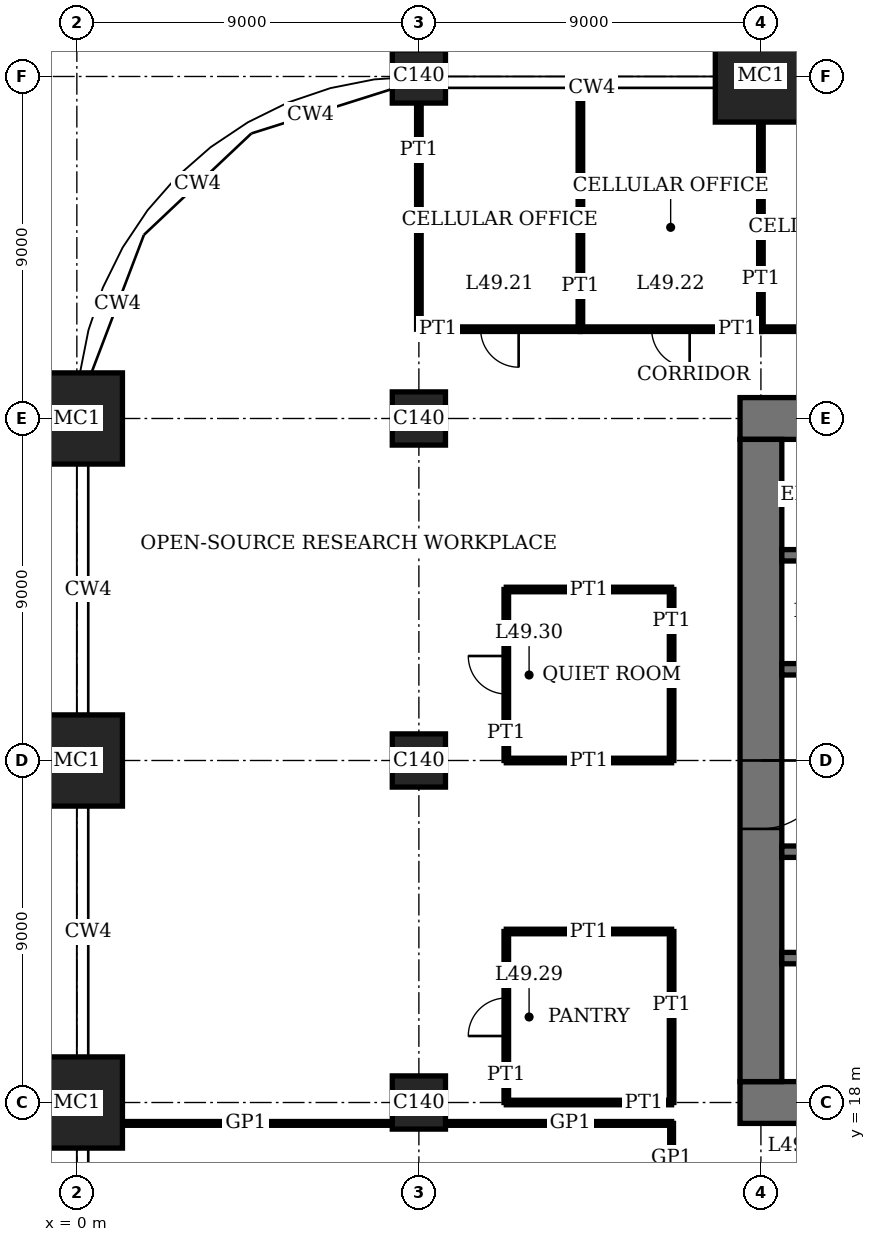
"""IFC4 building model, lengths in metres.
Left out: names, types, materials, properties, quantities, classifications, styles, units other than length and angle.
Written with IfcOpenShell. Run it as: python <this file> out.ifc"""

import sys

from ifc_helpers import new_model, si_unit, direction, frame, frame_2d, origin, origin_2d, place, context, subcontext, project, spatial, rectangle, extrude, element, fill, save


model = new_model("IFC4")
c1 = context("Model", 3, precision=1e-05, world=origin(), true_north=direction((0.0, 1.0)))
c2 = subcontext(c1, "Body", "Model", "MODEL_VIEW")
j1 = project(units=[si_unit("LENGTHUNIT", "METRE"), si_unit("PLANEANGLEUNIT", "RADIAN")], contexts=[c1])
p1 = place(None, origin())
s1 = spatial("IfcSite", under=j1, at=p1, CompositionType="ELEMENT")
p2 = place(p1, origin())
s2 = spatial("IfcBuilding", under=s1, at=p2, CompositionType="ELEMENT")
p3 = place(p2, frame((0.0, 0.0, 202.2)))
s3 = spatial("IfcBuildingStorey", under=s2, at=p3, CompositionType="ELEMENT", Elevation=202.2)
for number, where, z_axis, x_axis in (
    (1, (0.0, 18.0, 0.0), (0.0, 0.0, 1.0), (1.0, 0.0, 0.0)),
    (2, (0.0, 27.0, 0.0), (0.0, 0.0, 1.0), (1.0, 0.0, 0.0)),
    (3, (0.0, 36.0, 0.0), (0.0, 0.0, 1.0), (1.0, 0.0, 0.0)),
):
    element("IfcColumn", number, at=place(p3, frame(where, z_axis=z_axis, x_axis=x_axis)), inside=s3, PredefinedType="COLUMN", context=c2, shape_type="SweptSolid", body=[
        extrude(rectangle(XDim=2.4, YDim=2.4, at=origin_2d()), origin(), (0.0, 0.0, 1.0), 4.0),
    ])
for number, where, z_axis, x_axis in (
    (4, (9.0, 18.0, 0.0), (0.0, 0.0, 1.0), (1.0, 0.0, 0.0)),
    (5, (9.0, 27.0, 0.0), (0.0, 0.0, 1.0), (1.0, 0.0, 0.0)),
    (6, (9.0, 36.0, 0.0), (0.0, 0.0, 1.0), (1.0, 0.0, 0.0)),
    (7, (9.0, 45.0, 0.0), (0.0, 0.0, 1.0), (1.0, 0.0, 0.0)),
):
    element("IfcColumn", number, at=place(p3, frame(where, z_axis=z_axis, x_axis=x_axis)), inside=s3, PredefinedType="COLUMN", context=c2, shape_type="SweptSolid", body=[
        extrude(rectangle(XDim=1.4, YDim=1.4, at=origin_2d()), origin(), (0.0, 0.0, 1.0), 4.0),
    ])
p4 = place(p3, frame((18.0, 45.0, 0.0), z_axis=(0.0, 0.0, 1.0), x_axis=(1.0, 0.0, 0.0)))
e8 = element("IfcColumn", 8, at=p4, inside=s3, PredefinedType="COLUMN", context=c2, shape_type="SweptSolid", body=[
    extrude(rectangle(XDim=2.4, YDim=2.4, at=origin_2d()), origin(), (0.0, 0.0, 1.0), 4.0),
])
p5 = place(p3, frame((17.45, 18.0, 0.0), z_axis=(0.0, 0.0, 1.0), x_axis=(1.0, 0.0, 0.0)))
e9 = element("IfcWall", 9, at=p5, inside=s3, PredefinedType="SHEAR", context=c2, shape_type="SweptSolid", body=[
    extrude(rectangle(XDim=28.1, YDim=1.1, at=frame_2d((14.05, 0.0))), origin(), (0.0, 0.0, 1.0), 4.0),
])
p6 = place(p5, frame((11.55, 0.0, 0.0)))
e10 = element("IfcOpeningElement", 10, at=p6, cuts=e9, PredefinedType="OPENING", context=c2, shape_type="SweptSolid", body=[
    extrude(rectangle(XDim=1.0, YDim=2.4, at=frame_2d((0.5, 1.2))), frame((0.0, 0.56, 0.0), z_axis=(0.0, -1.0, 0.0), x_axis=(1.0, 0.0, 0.0)), (0.0, 0.0, 1.0), 1.12),
])
p7 = place(p5, frame((16.55, 0.0, 0.0)))
e11 = element("IfcOpeningElement", 11, at=p7, cuts=e9, PredefinedType="OPENING", context=c2, shape_type="SweptSolid", body=[
    extrude(rectangle(XDim=1.0, YDim=2.4, at=frame_2d((0.5, 1.2))), frame((0.0, 0.56, 0.0), z_axis=(0.0, -1.0, 0.0), x_axis=(1.0, 0.0, 0.0)), (0.0, 0.0, 1.0), 1.12),
])
p8 = place(p5, frame((20.0, 0.0, 0.0)))
e12 = element("IfcOpeningElement", 12, at=p8, cuts=e9, PredefinedType="OPENING", context=c2, shape_type="SweptSolid", body=[
    extrude(rectangle(XDim=1.1, YDim=2.4, at=frame_2d((0.55, 1.2))), frame((0.0, 0.56, 0.0), z_axis=(0.0, -1.0, 0.0), x_axis=(1.0, 0.0, 0.0)), (0.0, 0.0, 1.0), 1.12),
])
p9 = place(p5, frame((24.05, 0.0, 0.0)))
e13 = element("IfcOpeningElement", 13, at=p9, cuts=e9, PredefinedType="OPENING", context=c2, shape_type="SweptSolid", body=[
    extrude(rectangle(XDim=1.0, YDim=2.4, at=frame_2d((0.5, 1.2))), frame((0.0, 0.56, 0.0), z_axis=(0.0, -1.0, 0.0), x_axis=(1.0, 0.0, 0.0)), (0.0, 0.0, 1.0), 1.12),
])
p10 = place(p3, frame((45.55, 36.0, 0.0), z_axis=(0.0, 0.0, 1.0), x_axis=(-1.0, 0.0, 0.0)))
e14 = element("IfcWall", 14, at=p10, inside=s3, PredefinedType="SHEAR", context=c2, shape_type="SweptSolid", body=[
    extrude(rectangle(XDim=28.1, YDim=1.1, at=frame_2d((14.05, 0.0))), origin(), (0.0, 0.0, 1.0), 4.0),
])
p11 = place(p10, frame((11.55, 0.0, 0.0)))
e15 = element("IfcOpeningElement", 15, at=p11, cuts=e14, PredefinedType="OPENING", context=c2, shape_type="SweptSolid", body=[
    extrude(rectangle(XDim=1.0, YDim=2.4, at=frame_2d((0.5, 1.2))), frame((0.0, 0.56, 0.0), z_axis=(0.0, -1.0, 0.0), x_axis=(1.0, 0.0, 0.0)), (0.0, 0.0, 1.0), 1.12),
])
p12 = place(p10, frame((16.55, 0.0, 0.0)))
e16 = element("IfcOpeningElement", 16, at=p12, cuts=e14, PredefinedType="OPENING", context=c2, shape_type="SweptSolid", body=[
    extrude(rectangle(XDim=1.0, YDim=2.4, at=frame_2d((0.5, 1.2))), frame((0.0, 0.56, 0.0), z_axis=(0.0, -1.0, 0.0), x_axis=(1.0, 0.0, 0.0)), (0.0, 0.0, 1.0), 1.12),
])
p13 = place(p10, frame((20.0, 0.0, 0.0)))
e17 = element("IfcOpeningElement", 17, at=p13, cuts=e14, PredefinedType="OPENING", context=c2, shape_type="SweptSolid", body=[
    extrude(rectangle(XDim=1.1, YDim=2.4, at=frame_2d((0.55, 1.2))), frame((0.0, 0.56, 0.0), z_axis=(0.0, -1.0, 0.0), x_axis=(1.0, 0.0, 0.0)), (0.0, 0.0, 1.0), 1.12),
])
p14 = place(p10, frame((24.05, 0.0, 0.0)))
e18 = element("IfcOpeningElement", 18, at=p14, cuts=e14, PredefinedType="OPENING", context=c2, shape_type="SweptSolid", body=[
    extrude(rectangle(XDim=1.0, YDim=2.4, at=frame_2d((0.5, 1.2))), frame((0.0, 0.56, 0.0), z_axis=(0.0, -1.0, 0.0), x_axis=(1.0, 0.0, 0.0)), (0.0, 0.0, 1.0), 1.12),
])
p15 = place(p3, frame((18.0, 35.45, 0.0), z_axis=(0.0, 0.0, 1.0), x_axis=(0.0, -1.0, 0.0)))
e19 = element("IfcWall", 19, at=p15, inside=s3, PredefinedType="SHEAR", context=c2, shape_type="SweptSolid", body=[
    extrude(rectangle(XDim=16.9, YDim=1.1, at=frame_2d((8.45, 0.0))), origin(), (0.0, 0.0, 1.0), 4.0),
])
p16 = place(p15, frame((8.45, 0.0, 0.0)))
e20 = element("IfcOpeningElement", 20, at=p16, cuts=e19, PredefinedType="OPENING", context=c2, shape_type="SweptSolid", body=[
    extrude(rectangle(XDim=1.8, YDim=2.4, at=frame_2d((0.9, 1.2))), frame((0.0, 0.56, 0.0), z_axis=(0.0, -1.0, 0.0), x_axis=(1.0, 0.0, 0.0)), (0.0, 0.0, 1.0), 1.12),
])
p17 = place(p3, frame((18.55, 21.8, 0.0), z_axis=(0.0, 0.0, 1.0), x_axis=(1.0, 0.0, 0.0)))
e21 = element("IfcWall", 21, at=p17, inside=s3, PredefinedType="SHEAR", context=c2, shape_type="SweptSolid", body=[
    extrude(rectangle(XDim=8.3, YDim=0.3, at=frame_2d((4.15, 0.0))), origin(), (0.0, 0.0, 1.0), 4.0),
])
p18 = place(p17, frame((6.85, 0.0, 0.0)))
e22 = element("IfcOpeningElement", 22, at=p18, cuts=e21, PredefinedType="OPENING", context=c2, shape_type="SweptSolid", body=[
    extrude(rectangle(XDim=1.0, YDim=2.4, at=frame_2d((0.5, 1.2))), frame((0.0, 0.16, 0.0), z_axis=(0.0, -1.0, 0.0), x_axis=(1.0, 0.0, 0.0)), (0.0, 0.0, 1.0), 0.32),
])
p19 = place(p3, frame((18.55, 24.6, 0.0), z_axis=(0.0, 0.0, 1.0), x_axis=(1.0, 0.0, 0.0)))
e23 = element("IfcWall", 23, at=p19, inside=s3, PredefinedType="SHEAR", context=c2, shape_type="SweptSolid", body=[
    extrude(rectangle(XDim=25.9, YDim=0.3, at=frame_2d((12.95, 0.0))), origin(), (0.0, 0.0, 1.0), 4.0),
])
p20 = place(p19, frame((4.95, 0.0, 0.0)))
e24 = element("IfcOpeningElement", 24, at=p20, cuts=e23, PredefinedType="OPENING", context=c2, shape_type="SweptSolid", body=[
    extrude(rectangle(XDim=1.0, YDim=2.4, at=frame_2d((0.5, 1.2))), frame((0.0, 0.16, 0.0), z_axis=(0.0, -1.0, 0.0), x_axis=(1.0, 0.0, 0.0)), (0.0, 0.0, 1.0), 0.32),
])
p21 = place(p19, frame((24.5, 0.0, 0.0)))
e25 = element("IfcOpeningElement", 25, at=p21, cuts=e23, PredefinedType="OPENING", context=c2, shape_type="SweptSolid", body=[
    extrude(rectangle(XDim=0.9, YDim=2.1, at=frame_2d((0.45, 1.05))), frame((0.0, 0.16, 0.0), z_axis=(0.0, -1.0, 0.0), x_axis=(1.0, 0.0, 0.0)), (0.0, 0.0, 1.0), 0.32),
])
p22 = place(p19, frame((21.3, 0.0, 0.0)))
e26 = element("IfcOpeningElement", 26, at=p22, cuts=e23, PredefinedType="OPENING", context=c2, shape_type="SweptSolid", body=[
    extrude(rectangle(XDim=1.3, YDim=2.4, at=frame_2d((0.65, 1.2))), frame((0.0, 0.16, 0.0), z_axis=(0.0, -1.0, 0.0), x_axis=(1.0, 0.0, 0.0)), (0.0, 0.0, 1.0), 0.32),
])
p23 = place(p3, frame((18.55, 29.4, 0.0), z_axis=(0.0, 0.0, 1.0), x_axis=(1.0, 0.0, 0.0)))
e27 = element("IfcWall", 27, at=p23, inside=s3, PredefinedType="SHEAR", context=c2, shape_type="SweptSolid", body=[
    extrude(rectangle(XDim=25.9, YDim=0.3, at=frame_2d((12.95, 0.0))), origin(), (0.0, 0.0, 1.0), 4.0),
])
p24 = place(p23, frame((19.95, 0.0, 0.0)))
e28 = element("IfcOpeningElement", 28, at=p24, cuts=e27, PredefinedType="OPENING", context=c2, shape_type="SweptSolid", body=[
    extrude(rectangle(XDim=1.0, YDim=2.4, at=frame_2d((0.5, 1.2))), frame((0.0, 0.16, 0.0), z_axis=(0.0, -1.0, 0.0), x_axis=(1.0, 0.0, 0.0)), (0.0, 0.0, 1.0), 0.32),
])
p25 = place(p23, frame((0.5, 0.0, 0.0)))
e29 = element("IfcOpeningElement", 29, at=p25, cuts=e27, PredefinedType="OPENING", context=c2, shape_type="SweptSolid", body=[
    extrude(rectangle(XDim=0.9, YDim=2.1, at=frame_2d((0.45, 1.05))), frame((0.0, 0.16, 0.0), z_axis=(0.0, -1.0, 0.0), x_axis=(1.0, 0.0, 0.0)), (0.0, 0.0, 1.0), 0.32),
])
p26 = place(p23, frame((15.45, 0.0, 0.0)))
e30 = element("IfcOpeningElement", 30, at=p26, cuts=e27, PredefinedType="OPENING", context=c2, shape_type="SweptSolid", body=[
    extrude(rectangle(XDim=1.0, YDim=2.4, at=frame_2d((0.5, 1.2))), frame((0.0, 0.16, 0.0), z_axis=(0.0, -1.0, 0.0), x_axis=(1.0, 0.0, 0.0)), (0.0, 0.0, 1.0), 0.32),
])
p27 = place(p23, frame((12.45, 0.0, 0.0)))
e31 = element("IfcOpeningElement", 31, at=p27, cuts=e27, PredefinedType="OPENING", context=c2, shape_type="SweptSolid", body=[
    extrude(rectangle(XDim=1.0, YDim=2.4, at=frame_2d((0.5, 1.2))), frame((0.0, 0.16, 0.0), z_axis=(0.0, -1.0, 0.0), x_axis=(1.0, 0.0, 0.0)), (0.0, 0.0, 1.0), 0.32),
])
p28 = place(p23, frame((9.4, 0.0, 0.0)))
e32 = element("IfcOpeningElement", 32, at=p28, cuts=e27, PredefinedType="OPENING", context=c2, shape_type="SweptSolid", body=[
    extrude(rectangle(XDim=1.1, YDim=2.4, at=frame_2d((0.55, 1.2))), frame((0.0, 0.16, 0.0), z_axis=(0.0, -1.0, 0.0), x_axis=(1.0, 0.0, 0.0)), (0.0, 0.0, 1.0), 0.32),
])
p29 = place(p23, frame((6.4, 0.0, 0.0)))
e33 = element("IfcOpeningElement", 33, at=p29, cuts=e27, PredefinedType="OPENING", context=c2, shape_type="SweptSolid", body=[
    extrude(rectangle(XDim=1.1, YDim=2.4, at=frame_2d((0.55, 1.2))), frame((0.0, 0.16, 0.0), z_axis=(0.0, -1.0, 0.0), x_axis=(1.0, 0.0, 0.0)), (0.0, 0.0, 1.0), 0.32),
])
p30 = place(p23, frame((3.3, 0.0, 0.0)))
e34 = element("IfcOpeningElement", 34, at=p30, cuts=e27, PredefinedType="OPENING", context=c2, shape_type="SweptSolid", body=[
    extrude(rectangle(XDim=1.3, YDim=2.4, at=frame_2d((0.65, 1.2))), frame((0.0, 0.16, 0.0), z_axis=(0.0, -1.0, 0.0), x_axis=(1.0, 0.0, 0.0)), (0.0, 0.0, 1.0), 0.32),
])
p31 = place(p3, frame((18.55, 32.4, 0.0), z_axis=(0.0, 0.0, 1.0), x_axis=(1.0, 0.0, 0.0)))
e35 = element("IfcWall", 35, at=p31, inside=s3, PredefinedType="SHEAR", context=c2, shape_type="SweptSolid", body=[
    extrude(rectangle(XDim=17.3, YDim=0.3, at=frame_2d((8.65, 0.0))), origin(), (0.0, 0.0, 1.0), 4.0),
])
p32 = place(p3, frame((1.2, 17.45, 0.0), z_axis=(0.0, 0.0, 1.0), x_axis=(1.0, 0.0, 0.0)))
e36 = element("IfcWall", 36, at=p32, inside=s3, PredefinedType="PARTITIONING", context=c2, shape_type="SweptSolid", body=[
    extrude(rectangle(XDim=7.1, YDim=0.1, at=frame_2d((3.55, 0.0))), origin(), (0.0, 0.0, 1.0), 3.75),
])
p33 = place(p3, frame((9.7, 17.45, 0.0), z_axis=(0.0, 0.0, 1.0), x_axis=(1.0, 0.0, 0.0)))
e37 = element("IfcWall", 37, at=p33, inside=s3, PredefinedType="PARTITIONING", context=c2, shape_type="SweptSolid", body=[
    extrude(rectangle(XDim=5.95, YDim=0.1, at=frame_2d((2.975, 0.0))), origin(), (0.0, 0.0, 1.0), 3.75),
])
p34 = place(p3, frame((11.3, 18.0, 0.0), z_axis=(0.0, 0.0, 1.0), x_axis=(1.0, 0.0, 0.0)))
e38 = element("IfcWall", 38, at=p34, inside=s3, PredefinedType="PARTITIONING", context=c2, shape_type="SweptSolid", body=[
    extrude(rectangle(XDim=4.35, YDim=0.12, at=frame_2d((2.175, 0.0))), origin(), (0.0, 0.0, 1.0), 3.05),
])
p35 = place(p3, frame((11.3, 22.5, 0.0), z_axis=(0.0, 0.0, 1.0), x_axis=(1.0, 0.0, 0.0)))
e39 = element("IfcWall", 39, at=p35, inside=s3, PredefinedType="PARTITIONING", context=c2, shape_type="SweptSolid", body=[
    extrude(rectangle(XDim=4.35, YDim=0.12, at=frame_2d((2.175, 0.0))), origin(), (0.0, 0.0, 1.0), 3.1),
])
p36 = place(p3, frame((11.3, 27.0, 0.0), z_axis=(0.0, 0.0, 1.0), x_axis=(1.0, 0.0, 0.0)))
e40 = element("IfcWall", 40, at=p36, inside=s3, PredefinedType="PARTITIONING", context=c2, shape_type="SweptSolid", body=[
    extrude(rectangle(XDim=4.35, YDim=0.12, at=frame_2d((2.175, 0.0))), origin(), (0.0, 0.0, 1.0), 3.05),
])
p37 = place(p3, frame((11.3, 31.5, 0.0), z_axis=(0.0, 0.0, 1.0), x_axis=(1.0, 0.0, 0.0)))
e41 = element("IfcWall", 41, at=p37, inside=s3, PredefinedType="PARTITIONING", context=c2, shape_type="SweptSolid", body=[
    extrude(rectangle(XDim=4.35, YDim=0.12, at=frame_2d((2.175, 0.0))), origin(), (0.0, 0.0, 1.0), 3.1),
])
p38 = place(p3, frame((9.0, 38.35, 0.0), z_axis=(0.0, 0.0, 1.0), x_axis=(1.0, 0.0, 0.0)))
e42 = element("IfcWall", 42, at=p38, inside=s3, PredefinedType="PARTITIONING", context=c2, shape_type="SweptSolid", body=[
    extrude(rectangle(XDim=4.25, YDim=0.12, at=frame_2d((2.125, 0.0))), origin(), (0.0, 0.0, 1.0), 3.75),
])
p39 = place(p38, frame((1.625, 0.0, 0.0)))
e43 = element("IfcOpeningElement", 43, at=p39, cuts=e42, PredefinedType="OPENING", context=c2, shape_type="SweptSolid", body=[
    extrude(rectangle(XDim=1.0, YDim=2.4, at=frame_2d((0.5, 1.2))), frame((0.0, 0.07, 0.0), z_axis=(0.0, -1.0, 0.0), x_axis=(1.0, 0.0, 0.0)), (0.0, 0.0, 1.0), 0.14),
])
p40 = place(p3, frame((13.25, 38.35, 0.0), z_axis=(0.0, 0.0, 1.0), x_axis=(1.0, 0.0, 0.0)))
e44 = element("IfcWall", 44, at=p40, inside=s3, PredefinedType="PARTITIONING", context=c2, shape_type="SweptSolid", body=[
    extrude(rectangle(XDim=4.75, YDim=0.12, at=frame_2d((2.375, 0.0))), origin(), (0.0, 0.0, 1.0), 3.75),
])
p41 = place(p40, frame((1.875, 0.0, 0.0)))
e45 = element("IfcOpeningElement", 45, at=p41, cuts=e44, PredefinedType="OPENING", context=c2, shape_type="SweptSolid", body=[
    extrude(rectangle(XDim=1.0, YDim=2.4, at=frame_2d((0.5, 1.2))), frame((0.0, 0.07, 0.0), z_axis=(0.0, -1.0, 0.0), x_axis=(1.0, 0.0, 0.0)), (0.0, 0.0, 1.0), 0.14),
])
p42 = place(p3, frame((18.0, 38.35, 0.0), z_axis=(0.0, 0.0, 1.0), x_axis=(1.0, 0.0, 0.0)))
e46 = element("IfcWall", 46, at=p42, inside=s3, PredefinedType="PARTITIONING", context=c2, shape_type="SweptSolid", body=[
    extrude(rectangle(XDim=4.5, YDim=0.12, at=frame_2d((2.25, 0.0))), origin(), (0.0, 0.0, 1.0), 3.75),
])
p43 = place(p42, frame((1.75, 0.0, 0.0)))
e47 = element("IfcOpeningElement", 47, at=p43, cuts=e46, PredefinedType="OPENING", context=c2, shape_type="SweptSolid", body=[
    extrude(rectangle(XDim=1.0, YDim=2.4, at=frame_2d((0.5, 1.2))), frame((0.0, 0.07, 0.0), z_axis=(0.0, -1.0, 0.0), x_axis=(1.0, 0.0, 0.0)), (0.0, 0.0, 1.0), 0.14),
])
p44 = place(p3, frame((9.0, 38.35, 0.0), z_axis=(0.0, 0.0, 1.0), x_axis=(0.0, 1.0, 0.0)))
e48 = element("IfcWall", 48, at=p44, inside=s3, PredefinedType="PARTITIONING", context=c2, shape_type="SweptSolid", body=[
    extrude(rectangle(XDim=5.95, YDim=0.12, at=frame_2d((2.975, 0.0))), origin(), (0.0, 0.0, 1.0), 3.05),
])
p45 = place(p3, frame((11.3, 18.0, 0.0), z_axis=(0.0, 0.0, 1.0), x_axis=(0.0, 1.0, 0.0)))
e49 = element("IfcWall", 49, at=p45, inside=s3, PredefinedType="PARTITIONING", context=c2, shape_type="SweptSolid", body=[
    extrude(rectangle(XDim=4.5, YDim=0.12, at=frame_2d((2.25, 0.0))), origin(), (0.0, 0.0, 1.0), 3.75),
])
p46 = place(p45, frame((1.75, 0.0, 0.0)))
e50 = element("IfcOpeningElement", 50, at=p46, cuts=e49, PredefinedType="OPENING", context=c2, shape_type="SweptSolid", body=[
    extrude(rectangle(XDim=1.0, YDim=2.4, at=frame_2d((0.5, 1.2))), frame((0.0, 0.07, 0.0), z_axis=(0.0, -1.0, 0.0), x_axis=(1.0, 0.0, 0.0)), (0.0, 0.0, 1.0), 0.14),
])
p47 = place(p3, frame((11.3, 27.0, 0.0), z_axis=(0.0, 0.0, 1.0), x_axis=(0.0, 1.0, 0.0)))
e51 = element("IfcWall", 51, at=p47, inside=s3, PredefinedType="PARTITIONING", context=c2, shape_type="SweptSolid", body=[
    extrude(rectangle(XDim=4.5, YDim=0.12, at=frame_2d((2.25, 0.0))), origin(), (0.0, 0.0, 1.0), 3.75),
])
p48 = place(p47, frame((1.75, 0.0, 0.0)))
e52 = element("IfcOpeningElement", 52, at=p48, cuts=e51, PredefinedType="OPENING", context=c2, shape_type="SweptSolid", body=[
    extrude(rectangle(XDim=1.0, YDim=2.4, at=frame_2d((0.5, 1.2))), frame((0.0, 0.07, 0.0), z_axis=(0.0, -1.0, 0.0), x_axis=(1.0, 0.0, 0.0)), (0.0, 0.0, 1.0), 0.14),
])
p49 = place(p3, frame((13.25, 38.35, 0.0), z_axis=(0.0, 0.0, 1.0), x_axis=(0.0, 1.0, 0.0)))
e53 = element("IfcWall", 53, at=p49, inside=s3, PredefinedType="PARTITIONING", context=c2, shape_type="SweptSolid", body=[
    extrude(rectangle(XDim=6.34, YDim=0.12, at=frame_2d((3.17, 0.0))), origin(), (0.0, 0.0, 1.0), 3.75),
])
for number, where, z_axis, x_axis in (
    (54, (15.65, 18.0, 0.0), (0.0, 0.0, 1.0), (0.0, 1.0, 0.0)),
    (55, (15.65, 27.0, 0.0), (0.0, 0.0, 1.0), (0.0, 1.0, 0.0)),
):
    element("IfcWall", number, at=place(p3, frame(where, z_axis=z_axis, x_axis=x_axis)), inside=s3, PredefinedType="PARTITIONING", context=c2, shape_type="SweptSolid", body=[
        extrude(rectangle(XDim=4.5, YDim=0.12, at=frame_2d((2.25, 0.0))), origin(), (0.0, 0.0, 1.0), 3.75),
    ])
p50 = place(p3, frame((15.65, 15.65, 0.0), z_axis=(0.0, 0.0, 1.0), x_axis=(0.0, 1.0, 0.0)))
e56 = element("IfcWall", 56, at=p50, inside=s3, PredefinedType="PARTITIONING", context=c2, shape_type="SweptSolid", body=[
    extrude(rectangle(XDim=1.8, YDim=0.1, at=frame_2d((0.9, 0.0))), origin(), (0.0, 0.0, 1.0), 3.75),
])
p51 = place(p3, frame((18.0, 38.35, 0.0), z_axis=(0.0, 0.0, 1.0), x_axis=(0.0, 1.0, 0.0)))
e57 = element("IfcWall", 57, at=p51, inside=s3, PredefinedType="PARTITIONING", context=c2, shape_type="SweptSolid", body=[
    extrude(rectangle(XDim=5.45, YDim=0.12, at=frame_2d((2.725, 0.0))), origin(), (0.0, 0.0, 1.0), 3.05),
])
p52 = place(p16, origin())
e58 = element("IfcDoor", 58, at=p52, inside=s3, OperationType="DOUBLE_DOOR_DOUBLE_SWING", PredefinedType="DOOR", context=c2, shape_type="SweptSolid", body=[
    extrude(rectangle(XDim=1.8, YDim=2.4, at=frame_2d((0.9, 1.2))), frame((0.0, 0.03, 0.0), z_axis=(0.0, -1.0, 0.0), x_axis=(1.0, 0.0, 0.0)), (0.0, 0.0, 1.0), 0.06),
    extrude(rectangle(XDim=0.04, YDim=2.4, at=frame_2d((0.02, 1.2))), frame((0.0, 0.55, 0.0), z_axis=(0.0, -1.0, 0.0), x_axis=(1.0, 0.0, 0.0)), (0.0, 0.0, 1.0), 1.1),
    extrude(rectangle(XDim=0.04, YDim=2.4, at=frame_2d((1.78, 1.2))), frame((0.0, 0.55, 0.0), z_axis=(0.0, -1.0, 0.0), x_axis=(1.0, 0.0, 0.0)), (0.0, 0.0, 1.0), 1.1),
    extrude(rectangle(XDim=1.8, YDim=0.04, at=frame_2d((0.9, 2.38))), frame((0.0, 0.55, 0.0), z_axis=(0.0, -1.0, 0.0), x_axis=(1.0, 0.0, 0.0)), (0.0, 0.0, 1.0), 1.1),
])
fill(e20, e58)
p53 = place(p39, origin())
e59 = element("IfcDoor", 59, at=p53, inside=s3, OperationType="SINGLE_SWING_RIGHT", PredefinedType="DOOR", context=c2, shape_type="SweptSolid", body=[
    extrude(rectangle(XDim=1.0, YDim=2.4, at=frame_2d((0.5, 1.2))), frame((0.0, 0.025, 0.0), z_axis=(0.0, -1.0, 0.0), x_axis=(1.0, 0.0, 0.0)), (0.0, 0.0, 1.0), 0.05),
])
fill(e43, e59)
p54 = place(p41, origin())
e60 = element("IfcDoor", 60, at=p54, inside=s3, OperationType="SINGLE_SWING_RIGHT", PredefinedType="DOOR", context=c2, shape_type="SweptSolid", body=[
    extrude(rectangle(XDim=1.0, YDim=2.4, at=frame_2d((0.5, 1.2))), frame((0.0, 0.025, 0.0), z_axis=(0.0, -1.0, 0.0), x_axis=(1.0, 0.0, 0.0)), (0.0, 0.0, 1.0), 0.05),
])
fill(e45, e60)
p55 = place(p46, origin())
e61 = element("IfcDoor", 61, at=p55, inside=s3, OperationType="SINGLE_SWING_RIGHT", PredefinedType="DOOR", context=c2, shape_type="SweptSolid", body=[
    extrude(rectangle(XDim=1.0, YDim=2.4, at=frame_2d((0.5, 1.2))), frame((0.0, 0.025, 0.0), z_axis=(0.0, -1.0, 0.0), x_axis=(1.0, 0.0, 0.0)), (0.0, 0.0, 1.0), 0.05),
])
fill(e50, e61)
p56 = place(p48, origin())
e62 = element("IfcDoor", 62, at=p56, inside=s3, OperationType="SINGLE_SWING_LEFT", PredefinedType="DOOR", context=c2, shape_type="SweptSolid", body=[
    extrude(rectangle(XDim=1.0, YDim=2.4, at=frame_2d((0.5, 1.2))), frame((0.0, 0.025, 0.0), z_axis=(0.0, -1.0, 0.0), x_axis=(1.0, 0.0, 0.0)), (0.0, 0.0, 1.0), 0.05),
])
fill(e52, e62)
save(model, sys.argv[1])
